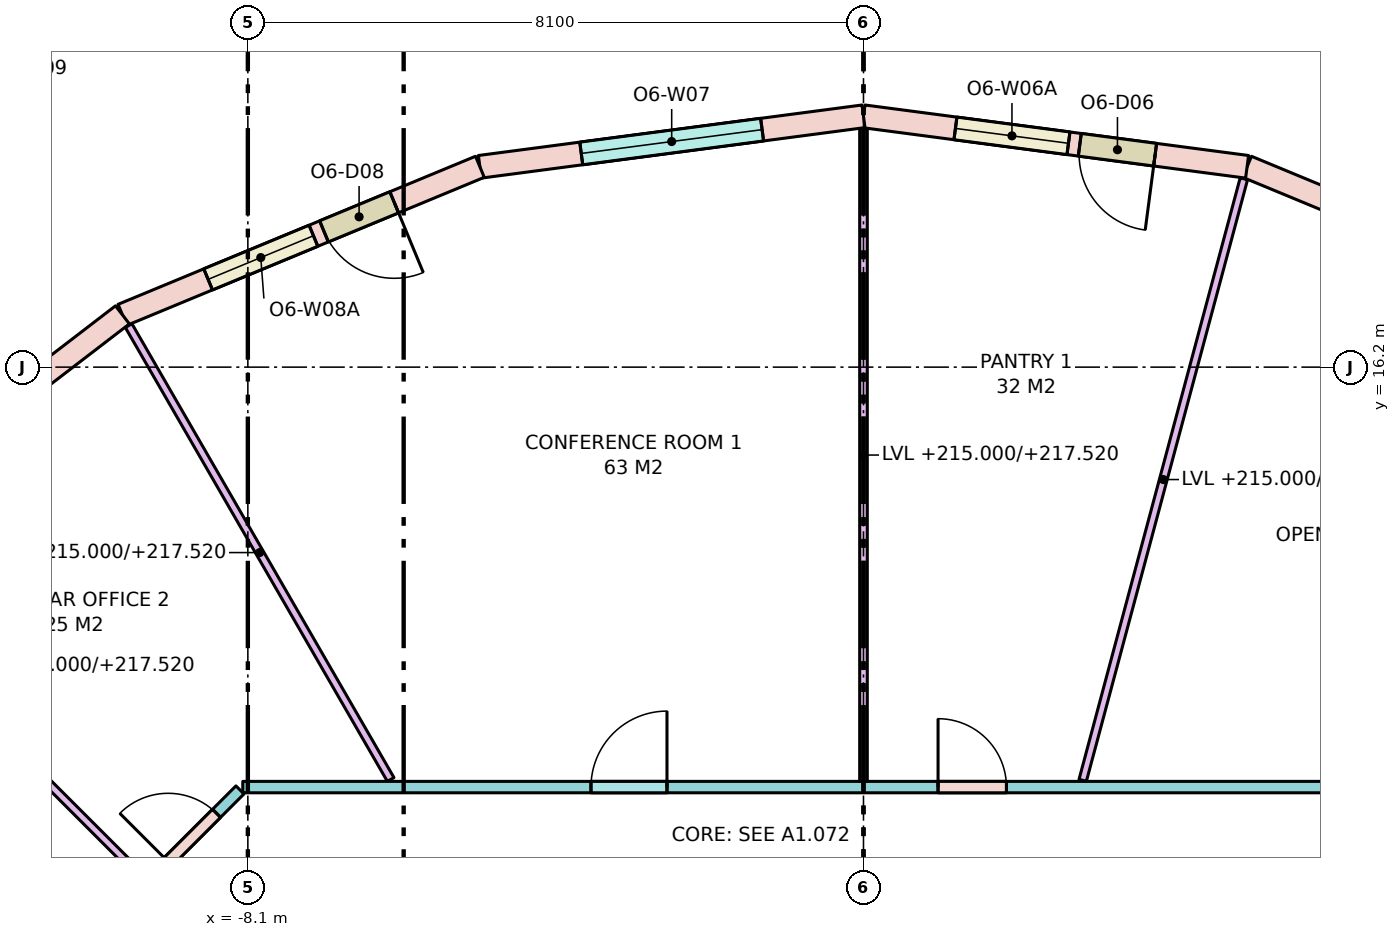
"""IFC4 building model, lengths in metres.
Left out: names, types, materials, properties, quantities, classifications, styles, units other than length and angle.
Written with IfcOpenShell. Run it as: python <this file> out.ifc"""

import sys

from ifc_helpers import new_model, si_unit, direction, frame, frame_2d, origin, place, context, subcontext, project, spatial, rectangle, extrude, element, fill, save


model = new_model("IFC4")
c1 = context("Model", 3, precision=1e-05, world=origin(), true_north=direction((0.0, 1.0)))
c2 = subcontext(c1, "Body", "Model", "MODEL_VIEW")
j1 = project(units=[si_unit("LENGTHUNIT", "METRE"), si_unit("PLANEANGLEUNIT", "RADIAN")], contexts=[c1])
p1 = place(None, origin())
s1 = spatial("IfcSite", under=j1, at=p1, CompositionType="ELEMENT")
p2 = place(p1, origin())
s2 = spatial("IfcBuilding", under=s1, at=p2, CompositionType="ELEMENT")
p3 = place(p2, frame((0.0, 0.0, 215.0)))
s3 = spatial("IfcBuildingStorey", under=s2, at=p3, CompositionType="ELEMENT", Elevation=215.0)
p4 = place(p3, frame((9.75, 16.887, 0.0), z_axis=(0.0, 0.0, 1.0), x_axis=(-0.923862504675, 0.382724538613, 0.0)))
e1 = element("IfcWall", 1, at=p4, inside=s3, PredefinedType="STANDARD", context=c2, shape_type="SweptSolid", body=[
    extrude(rectangle(XDim=5.091, YDim=0.3, at=frame_2d((2.545, 0.0))), origin(), (0.0, 0.0, 1.0), 3.42),
])
p5 = place(p4, frame((1.345, 0.0, 0.8)))
e2 = element("IfcOpeningElement", 2, at=p5, cuts=e1, PredefinedType="OPENING", context=c2, shape_type="SweptSolid", body=[
    extrude(rectangle(XDim=2.4, YDim=2.4, at=frame_2d((1.2, 1.2))), frame((0.0, 0.16, 0.0), z_axis=(0.0, -1.0, 0.0), x_axis=(1.0, 0.0, 0.0)), (0.0, 0.0, 1.0), 0.32),
])
p6 = place(p3, frame((5.047, 18.836, 0.0), z_axis=(0.0, 0.0, 1.0), x_axis=(-0.99144890792, 0.130495451964, 0.0)))
e3 = element("IfcWall", 3, at=p6, inside=s3, PredefinedType="STANDARD", context=c2, shape_type="SweptSolid", body=[
    extrude(rectangle(XDim=5.091, YDim=0.3, at=frame_2d((2.545, 0.0))), origin(), (0.0, 0.0, 1.0), 3.42),
])
p7 = place(p6, frame((1.22, 0.0, 0.0)))
e4 = element("IfcOpeningElement", 4, at=p7, cuts=e3, PredefinedType="OPENING", context=c2, shape_type="SweptSolid", body=[
    extrude(rectangle(XDim=1.0, YDim=2.4, at=frame_2d((0.5, 1.2))), frame((0.0, 0.16, 0.0), z_axis=(0.0, -1.0, 0.0), x_axis=(1.0, 0.0, 0.0)), (0.0, 0.0, 1.0), 0.32),
])
p8 = place(p6, frame((2.37, 0.0, 0.8)))
e5 = element("IfcOpeningElement", 5, at=p8, cuts=e3, PredefinedType="OPENING", context=c2, shape_type="SweptSolid", body=[
    extrude(rectangle(XDim=1.5, YDim=2.4, at=frame_2d((0.75, 1.2))), frame((0.0, 0.16, 0.0), z_axis=(0.0, -1.0, 0.0), x_axis=(1.0, 0.0, 0.0)), (0.0, 0.0, 1.0), 0.32),
])
p9 = place(p3, frame((0.0, 19.5, 0.0), z_axis=(0.0, 0.0, 1.0), x_axis=(-0.99144890792, -0.130495451964, 0.0)))
e6 = element("IfcWall", 6, at=p9, inside=s3, PredefinedType="STANDARD", context=c2, shape_type="SweptSolid", body=[
    extrude(rectangle(XDim=5.091, YDim=0.3, at=frame_2d((2.545, 0.0))), origin(), (0.0, 0.0, 1.0), 3.42),
])
p10 = place(p9, frame((1.345, 0.0, 0.8)))
e7 = element("IfcOpeningElement", 7, at=p10, cuts=e6, PredefinedType="OPENING", context=c2, shape_type="SweptSolid", body=[
    extrude(rectangle(XDim=2.4, YDim=2.4, at=frame_2d((1.2, 1.2))), frame((0.0, 0.16, 0.0), z_axis=(0.0, -1.0, 0.0), x_axis=(1.0, 0.0, 0.0)), (0.0, 0.0, 1.0), 0.32),
])
p11 = place(p3, frame((-5.047, 18.836, 0.0), z_axis=(0.0, 0.0, 1.0), x_axis=(-0.923862504675, -0.382724538613, 0.0)))
e8 = element("IfcWall", 8, at=p11, inside=s3, PredefinedType="STANDARD", context=c2, shape_type="SweptSolid", body=[
    extrude(rectangle(XDim=5.091, YDim=0.3, at=frame_2d((2.545, 0.0))), origin(), (0.0, 0.0, 1.0), 3.42),
])
p12 = place(p11, frame((1.22, 0.0, 0.0)))
e9 = element("IfcOpeningElement", 9, at=p12, cuts=e8, PredefinedType="OPENING", context=c2, shape_type="SweptSolid", body=[
    extrude(rectangle(XDim=1.0, YDim=2.4, at=frame_2d((0.5, 1.2))), frame((0.0, 0.16, 0.0), z_axis=(0.0, -1.0, 0.0), x_axis=(1.0, 0.0, 0.0)), (0.0, 0.0, 1.0), 0.32),
])
p13 = place(p11, frame((2.37, 0.0, 0.8)))
e10 = element("IfcOpeningElement", 10, at=p13, cuts=e8, PredefinedType="OPENING", context=c2, shape_type="SweptSolid", body=[
    extrude(rectangle(XDim=1.5, YDim=2.4, at=frame_2d((0.75, 1.2))), frame((0.0, 0.16, 0.0), z_axis=(0.0, -1.0, 0.0), x_axis=(1.0, 0.0, 0.0)), (0.0, 0.0, 1.0), 0.32),
])
p14 = place(p3, frame((-9.75, 16.887, 0.0), z_axis=(0.0, 0.0, 1.0), x_axis=(-0.79335619014, -0.608757714995, 0.0)))
e11 = element("IfcWall", 11, at=p14, inside=s3, PredefinedType="STANDARD", context=c2, shape_type="SweptSolid", body=[
    extrude(rectangle(XDim=5.091, YDim=0.3, at=frame_2d((2.545, 0.0))), origin(), (0.0, 0.0, 1.0), 3.42),
])
p15 = place(p14, frame((1.345, 0.0, 0.8)))
e12 = element("IfcOpeningElement", 12, at=p15, cuts=e11, PredefinedType="OPENING", context=c2, shape_type="SweptSolid", body=[
    extrude(rectangle(XDim=2.4, YDim=2.4, at=frame_2d((1.2, 1.2))), frame((0.0, 0.16, 0.0), z_axis=(0.0, -1.0, 0.0), x_axis=(1.0, 0.0, 0.0)), (0.0, 0.0, 1.0), 0.32),
])
p16 = place(p3, frame((-12.638, 6.204, 0.0), z_axis=(0.0, 0.0, 1.0), x_axis=(0.707106781187, 0.707106781187, 0.0)))
e13 = element("IfcWall", 13, at=p16, inside=s3, PredefinedType="PARTITIONING", context=c2, shape_type="SweptSolid", body=[
    extrude(rectangle(XDim=6.271, YDim=0.15, at=frame_2d((3.135, 0.0))), origin(), (0.0, 0.0, 1.0), 2.52),
])
p17 = place(p16, frame((4.935, 0.0, 0.0)))
e14 = element("IfcOpeningElement", 14, at=p17, cuts=e13, PredefinedType="OPENING", context=c2, shape_type="SweptSolid", body=[
    extrude(rectangle(XDim=0.9, YDim=2.1, at=frame_2d((0.45, 1.05))), frame((0.0, 0.085, 0.0), z_axis=(0.0, -1.0, 0.0), x_axis=(1.0, 0.0, 0.0)), (0.0, 0.0, 1.0), 0.17),
])
p18 = place(p16, frame((2.314, 0.0, 0.0)))
e15 = element("IfcOpeningElement", 15, at=p18, cuts=e13, PredefinedType="OPENING", context=c2, shape_type="SweptSolid", body=[
    extrude(rectangle(XDim=0.9, YDim=2.1, at=frame_2d((0.45, 1.05))), frame((0.0, 0.085, 0.0), z_axis=(0.0, -1.0, 0.0), x_axis=(1.0, 0.0, 0.0)), (0.0, 0.0, 1.0), 0.17),
])
p19 = place(p3, frame((-8.167, 10.675, 0.0), z_axis=(0.0, 0.0, 1.0), x_axis=(1.0, 0.0, 0.0)))
e16 = element("IfcWall", 16, at=p19, inside=s3, PredefinedType="PARTITIONING", context=c2, shape_type="SweptSolid", body=[
    extrude(rectangle(XDim=16.333, YDim=0.15, at=frame_2d((8.167, 0.0))), origin(), (0.0, 0.0, 1.0), 2.52),
])
p20 = place(p19, frame((9.148, 0.0, 0.0)))
e17 = element("IfcOpeningElement", 17, at=p20, cuts=e16, PredefinedType="OPENING", context=c2, shape_type="SweptSolid", body=[
    extrude(rectangle(XDim=0.9, YDim=2.1, at=frame_2d((0.45, 1.05))), frame((0.0, 0.085, 0.0), z_axis=(0.0, -1.0, 0.0), x_axis=(1.0, 0.0, 0.0)), (0.0, 0.0, 1.0), 0.17),
])
p21 = place(p19, frame((4.581, 0.0, 0.0)))
e18 = element("IfcOpeningElement", 18, at=p21, cuts=e16, PredefinedType="OPENING", context=c2, shape_type="SweptSolid", body=[
    extrude(rectangle(XDim=1.0, YDim=2.1, at=frame_2d((0.5, 1.05))), frame((0.0, 0.085, 0.0), z_axis=(0.0, -1.0, 0.0), x_axis=(1.0, 0.0, 0.0)), (0.0, 0.0, 1.0), 0.17),
])
p22 = place(p3, frame((2.884, 10.764, 0.0), z_axis=(0.0, 0.0, 1.0), x_axis=(0.258818011497, 0.965926103242, 0.0)))
e19 = element("IfcWall", 19, at=p22, inside=s3, PredefinedType="PARTITIONING", context=c2, shape_type="SweptSolid", body=[
    extrude(rectangle(XDim=8.192, YDim=0.1, at=frame_2d((4.096, 0.0))), origin(), (0.0, 0.0, 1.0), 2.52),
])
p23 = place(p3, frame((0.0, 10.75, 0.0), z_axis=(0.0, 0.0, 1.0), x_axis=(0.0, 1.0, 0.0)))
e20 = element("IfcWall", 20, at=p23, inside=s3, PredefinedType="PARTITIONING", context=c2, shape_type="SweptSolid", body=[
    extrude(rectangle(XDim=8.587, YDim=0.1, at=frame_2d((4.293, 0.0))), origin(), (0.0, 0.0, 1.0), 2.52),
])
p24 = place(p3, frame((-6.221, 10.775, 0.0), z_axis=(0.0, 0.0, 1.0), x_axis=(-0.500015661236, 0.866016361577, 0.0)))
e21 = element("IfcWall", 21, at=p24, inside=s3, PredefinedType="PARTITIONING", context=c2, shape_type="SweptSolid", body=[
    extrude(rectangle(XDim=6.895, YDim=0.1, at=frame_2d((3.448, 0.0))), origin(), (0.0, 0.0, 1.0), 2.52),
])
p25 = place(p3, frame((-9.474, 9.474, 0.0), z_axis=(0.0, 0.0, 1.0), x_axis=(-0.707106781187, 0.707106781187, 0.0)))
e22 = element("IfcWall", 22, at=p25, inside=s3, PredefinedType="PARTITIONING", context=c2, shape_type="SweptSolid", body=[
    extrude(rectangle(XDim=5.938, YDim=0.1, at=frame_2d((2.969, 0.0))), origin(), (0.0, 0.0, 1.0), 2.52),
])
p26 = place(p7, origin())
e23 = element("IfcDoor", 23, at=p26, inside=s3, OperationType="SINGLE_SWING_LEFT", PredefinedType="DOOR", context=c2, shape_type="SweptSolid", body=[
    extrude(rectangle(XDim=1.0, YDim=2.4, at=frame_2d((0.5, 1.2))), frame((0.0, 0.025, 0.0), z_axis=(0.0, -1.0, 0.0), x_axis=(1.0, 0.0, 0.0)), (0.0, 0.0, 1.0), 0.05),
])
fill(e4, e23)
p27 = place(p8, origin())
e24 = element("IfcWindow", 24, at=p27, inside=s3, PartitioningType="SINGLE_PANEL", PredefinedType="WINDOW", context=c2, shape_type="SweptSolid", body=[
    extrude(rectangle(XDim=1.5, YDim=2.4, at=frame_2d((0.75, 1.2))), frame((0.0, 0.03, 0.0), z_axis=(0.0, -1.0, 0.0), x_axis=(1.0, 0.0, 0.0)), (0.0, 0.0, 1.0), 0.06),
])
fill(e5, e24)
p28 = place(p10, origin())
e25 = element("IfcWindow", 25, at=p28, inside=s3, PartitioningType="SINGLE_PANEL", PredefinedType="WINDOW", context=c2, shape_type="SweptSolid", body=[
    extrude(rectangle(XDim=2.4, YDim=2.4, at=frame_2d((1.2, 1.2))), frame((0.0, 0.03, 0.0), z_axis=(0.0, -1.0, 0.0), x_axis=(1.0, 0.0, 0.0)), (0.0, 0.0, 1.0), 0.06),
])
fill(e7, e25)
p29 = place(p12, origin())
e26 = element("IfcDoor", 26, at=p29, inside=s3, OperationType="SINGLE_SWING_LEFT", PredefinedType="DOOR", context=c2, shape_type="SweptSolid", body=[
    extrude(rectangle(XDim=1.0, YDim=2.4, at=frame_2d((0.5, 1.2))), frame((0.0, 0.025, 0.0), z_axis=(0.0, -1.0, 0.0), x_axis=(1.0, 0.0, 0.0)), (0.0, 0.0, 1.0), 0.05),
])
fill(e9, e26)
p30 = place(p13, origin())
e27 = element("IfcWindow", 27, at=p30, inside=s3, PartitioningType="SINGLE_PANEL", PredefinedType="WINDOW", context=c2, shape_type="SweptSolid", body=[
    extrude(rectangle(XDim=1.5, YDim=2.4, at=frame_2d((0.75, 1.2))), frame((0.0, 0.03, 0.0), z_axis=(0.0, -1.0, 0.0), x_axis=(1.0, 0.0, 0.0)), (0.0, 0.0, 1.0), 0.06),
])
fill(e10, e27)
p31 = place(p20, origin())
e28 = element("IfcDoor", 28, at=p31, inside=s3, OperationType="SINGLE_SWING_LEFT", PredefinedType="DOOR", context=c2, shape_type="SweptSolid", body=[
    extrude(rectangle(XDim=0.9, YDim=2.1, at=frame_2d((0.45, 1.05))), frame((0.0, 0.025, 0.0), z_axis=(0.0, -1.0, 0.0), x_axis=(1.0, 0.0, 0.0)), (0.0, 0.0, 1.0), 0.05),
])
fill(e17, e28)
p32 = place(p21, origin())
e29 = element("IfcDoor", 29, at=p32, inside=s3, OperationType="SINGLE_SWING_RIGHT", PredefinedType="DOOR", context=c2, shape_type="SweptSolid", body=[
    extrude(rectangle(XDim=1.0, YDim=2.1, at=frame_2d((0.5, 1.05))), frame((0.0, 0.025, 0.0), z_axis=(0.0, -1.0, 0.0), x_axis=(1.0, 0.0, 0.0)), (0.0, 0.0, 1.0), 0.05),
])
fill(e18, e29)
p33 = place(p17, origin())
e30 = element("IfcDoor", 30, at=p33, inside=s3, OperationType="SINGLE_SWING_LEFT", PredefinedType="DOOR", context=c2, shape_type="SweptSolid", body=[
    extrude(rectangle(XDim=0.9, YDim=2.1, at=frame_2d((0.45, 1.05))), frame((0.0, 0.025, 0.0), z_axis=(0.0, -1.0, 0.0), x_axis=(1.0, 0.0, 0.0)), (0.0, 0.0, 1.0), 0.05),
])
fill(e14, e30)
save(model, sys.argv[1])
